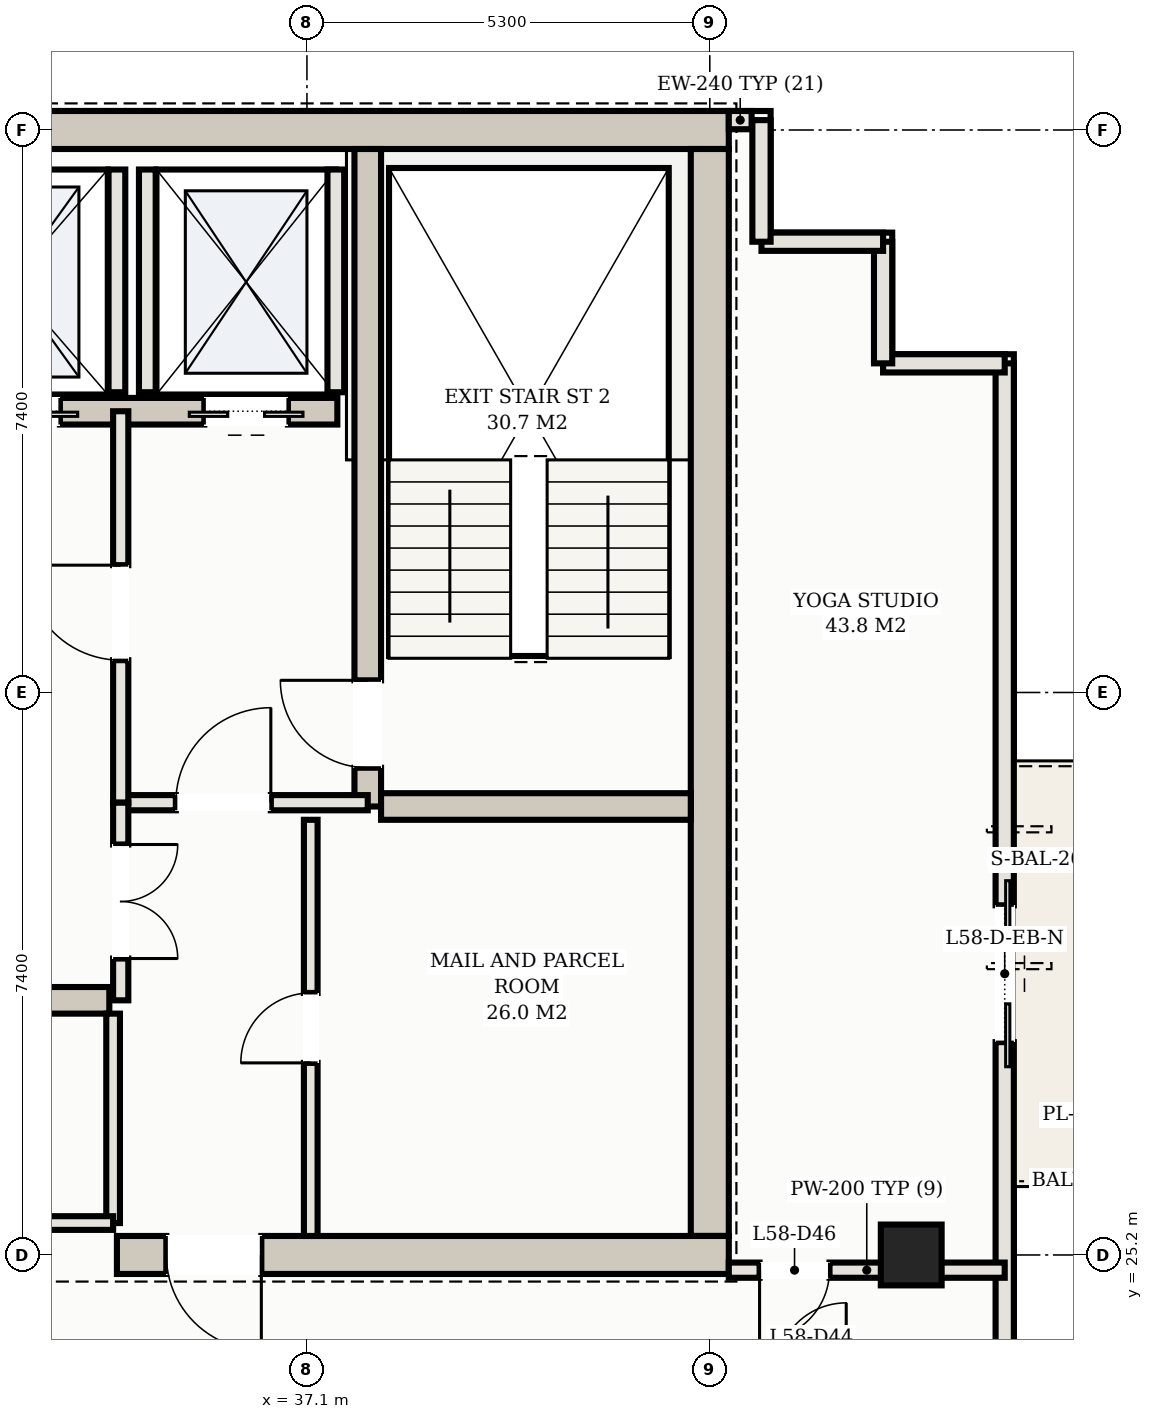
"""IFC4 building model, lengths in metres.
Left out: names, types, materials, properties, quantities, classifications, styles, units other than length and angle.
Written with IfcOpenShell. Run it as: python <this file> out.ifc"""

import sys

from ifc_helpers import new_model, si_unit, direction, frame, frame_2d, origin, origin_2d, place, context, subcontext, project, spatial, rectangle, hollow_rectangle, extrude, element, fill, save


model = new_model("IFC4")
c1 = context("Model", 3, precision=1e-05, world=origin(), true_north=direction((0.0, 1.0)))
c2 = subcontext(c1, "Body", "Model", "MODEL_VIEW")
j1 = project(units=[si_unit("LENGTHUNIT", "METRE"), si_unit("PLANEANGLEUNIT", "RADIAN")], contexts=[c1])
p1 = place(None, origin())
s1 = spatial("IfcSite", under=j1, at=p1, CompositionType="ELEMENT")
p2 = place(p1, origin())
s2 = spatial("IfcBuilding", under=s1, at=p2, CompositionType="ELEMENT")
p3 = place(p2, frame((0.0, 0.0, 213.2)))
s3 = spatial("IfcBuildingStorey", under=s2, at=p3, CompositionType="ELEMENT", Elevation=213.2)
p4 = place(p3, frame((10.35, 40.0, 0.0), z_axis=(0.0, 0.0, 1.0), x_axis=(1.0, 0.0, 0.0)))
e1 = element("IfcWall", 1, at=p4, inside=s3, PredefinedType="SHEAR", context=c2, shape_type="SweptSolid", body=[
    extrude(rectangle(XDim=32.3, YDim=0.5, at=frame_2d((16.15, 0.0))), origin(), (0.0, 0.0, 1.0), 3.11),
])
p5 = place(p3, frame((42.4, 25.45, 0.0), z_axis=(0.0, 0.0, 1.0), x_axis=(0.0, 1.0, 0.0)))
e2 = element("IfcWall", 2, at=p5, inside=s3, PredefinedType="SHEAR", context=c2, shape_type="SweptSolid", body=[
    extrude(rectangle(XDim=14.3, YDim=0.5, at=frame_2d((7.15, 0.0))), origin(), (0.0, 0.0, 1.0), 3.11),
])
p6 = place(p3, frame((34.6, 25.2, 0.0), z_axis=(0.0, 0.0, 1.0), x_axis=(1.0, 0.0, 0.0)))
e3 = element("IfcWall", 3, at=p6, inside=s3, PredefinedType="SHEAR", context=c2, shape_type="SweptSolid", body=[
    extrude(rectangle(XDim=8.05, YDim=0.5, at=frame_2d((4.025, 0.0))), origin(), (0.0, 0.0, 1.0), 3.11),
])
p7 = place(p6, frame((0.65, 0.0, 0.0)))
e4 = element("IfcOpeningElement", 4, at=p7, cuts=e3, PredefinedType="OPENING", context=c2, shape_type="SweptSolid", body=[
    extrude(rectangle(XDim=1.25, YDim=2.2, at=frame_2d((0.625, 1.1))), frame((0.0, 0.26, 0.0), z_axis=(0.0, -1.0, 0.0), x_axis=(1.0, 0.0, 0.0)), (0.0, 0.0, 1.0), 0.52),
])
p8 = place(p3, frame((37.9, 31.1, 0.0), z_axis=(0.0, 0.0, 1.0), x_axis=(0.0, 1.0, 0.0)))
e5 = element("IfcWall", 5, at=p8, inside=s3, PredefinedType="SHEAR", context=c2, shape_type="SweptSolid", body=[
    extrude(rectangle(XDim=8.65, YDim=0.35, at=frame_2d((4.325, 0.0))), origin(), (0.0, 0.0, 1.0), 3.11),
])
p9 = place(p8, frame((0.51, 0.0, 0.0)))
e6 = element("IfcOpeningElement", 6, at=p9, cuts=e5, PredefinedType="OPENING", context=c2, shape_type="SweptSolid", body=[
    extrude(rectangle(XDim=1.15, YDim=2.2, at=frame_2d((0.575, 1.1))), frame((0.0, 0.185, 0.0), z_axis=(0.0, -1.0, 0.0), x_axis=(1.0, 0.0, 0.0)), (0.0, 0.0, 1.0), 0.37),
])
p10 = place(p3, frame((38.075, 31.1, 0.0), z_axis=(0.0, 0.0, 1.0), x_axis=(1.0, 0.0, 0.0)))
e7 = element("IfcWall", 7, at=p10, inside=s3, PredefinedType="SHEAR", context=c2, shape_type="SweptSolid", body=[
    extrude(rectangle(XDim=4.075, YDim=0.35, at=frame_2d((2.038, 0.0))), origin(), (0.0, 0.0, 1.0), 3.11),
])
p11 = place(p3, frame((15.5, 36.3, 0.0), z_axis=(0.0, 0.0, 1.0), x_axis=(1.0, 0.0, 0.0)))
e8 = element("IfcWall", 8, at=p11, inside=s3, PredefinedType="SHEAR", context=c2, shape_type="SweptSolid", body=[
    extrude(rectangle(XDim=22.0, YDim=0.35, at=frame_2d((11.0, 0.0))), origin(), (0.0, 0.0, 1.0), 3.11),
])
p12 = place(p11, frame((0.65, 0.0, 0.0)))
e9 = element("IfcOpeningElement", 9, at=p12, cuts=e8, PredefinedType="OPENING", context=c2, shape_type="SweptSolid", body=[
    extrude(rectangle(XDim=1.1, YDim=2.15, at=frame_2d((0.55, 1.075))), frame((0.0, 0.185, 0.0), z_axis=(0.0, -1.0, 0.0), x_axis=(1.0, 0.0, 0.0)), (0.0, 0.0, 1.0), 0.37),
])
p13 = place(p11, frame((20.25, 0.0, 0.0)))
e10 = element("IfcOpeningElement", 10, at=p13, cuts=e8, PredefinedType="OPENING", context=c2, shape_type="SweptSolid", body=[
    extrude(rectangle(XDim=1.1, YDim=2.15, at=frame_2d((0.55, 1.075))), frame((0.0, 0.185, 0.0), z_axis=(0.0, -1.0, 0.0), x_axis=(1.0, 0.0, 0.0)), (0.0, 0.0, 1.0), 0.37),
])
p14 = place(p11, frame((17.05, 0.0, 0.0)))
e11 = element("IfcOpeningElement", 11, at=p14, cuts=e8, PredefinedType="OPENING", context=c2, shape_type="SweptSolid", body=[
    extrude(rectangle(XDim=1.3, YDim=2.2, at=frame_2d((0.65, 1.1))), frame((0.0, 0.185, 0.0), z_axis=(0.0, -1.0, 0.0), x_axis=(1.0, 0.0, 0.0)), (0.0, 0.0, 1.0), 0.37),
])
p15 = place(p11, frame((3.95, 0.0, 0.0)))
e12 = element("IfcOpeningElement", 12, at=p15, cuts=e8, PredefinedType="OPENING", context=c2, shape_type="SweptSolid", body=[
    extrude(rectangle(XDim=1.1, YDim=2.15, at=frame_2d((0.55, 1.075))), frame((0.0, 0.185, 0.0), z_axis=(0.0, -1.0, 0.0), x_axis=(1.0, 0.0, 0.0)), (0.0, 0.0, 1.0), 0.37),
])
p16 = place(p11, frame((6.55, 0.0, 0.0)))
e13 = element("IfcOpeningElement", 13, at=p16, cuts=e8, PredefinedType="OPENING", context=c2, shape_type="SweptSolid", body=[
    extrude(rectangle(XDim=1.1, YDim=2.15, at=frame_2d((0.55, 1.075))), frame((0.0, 0.185, 0.0), z_axis=(0.0, -1.0, 0.0), x_axis=(1.0, 0.0, 0.0)), (0.0, 0.0, 1.0), 0.37),
])
p17 = place(p11, frame((9.15, 0.0, 0.0)))
e14 = element("IfcOpeningElement", 14, at=p17, cuts=e8, PredefinedType="OPENING", context=c2, shape_type="SweptSolid", body=[
    extrude(rectangle(XDim=1.1, YDim=2.15, at=frame_2d((0.55, 1.075))), frame((0.0, 0.185, 0.0), z_axis=(0.0, -1.0, 0.0), x_axis=(1.0, 0.0, 0.0)), (0.0, 0.0, 1.0), 0.37),
])
p18 = place(p3, frame((18.5, 28.55, 0.0), z_axis=(0.0, 0.0, 1.0), x_axis=(1.0, 0.0, 0.0)))
e15 = element("IfcWall", 15, at=p18, inside=s3, PredefinedType="SHEAR", context=c2, shape_type="SweptSolid", body=[
    extrude(rectangle(XDim=16.0, YDim=0.35, at=frame_2d((8.0, 0.0))), origin(), (0.0, 0.0, 1.0), 3.11),
])
p19 = place(p3, frame((45.05, 25.2, 0.0), z_axis=(0.0, 0.0, 1.0), x_axis=(1.0, 0.0, 0.0)))
e16 = element("IfcColumn", 16, at=p19, inside=s3, PredefinedType="COLUMN", context=c2, shape_type="SweptSolid", body=[
    extrude(hollow_rectangle(XDim=0.8, YDim=0.8, WallThickness=0.028, at=origin_2d()), origin(), (0.0, 0.0, 1.0), 3.3),
])
for number, where, z_axis, x_axis in (
    (17, (35.0, 36.55, 0.0), (0.0, 0.0, 1.0), (0.0, 1.0, 0.0)),
    (18, (37.48, 36.55, 0.0), (0.0, 0.0, 1.0), (0.0, 1.0, 0.0)),
    (19, (34.6, 36.55, 0.0), (0.0, 0.0, 1.0), (0.0, 1.0, 0.0)),
):
    element("IfcWall", number, at=place(p3, frame(where, z_axis=z_axis, x_axis=x_axis)), inside=s3, PredefinedType="SOLIDWALL", context=c2, shape_type="SweptSolid", body=[
        extrude(rectangle(XDim=2.93, YDim=0.22, at=frame_2d((1.465, 0.0))), origin(), (0.0, 0.0, 1.0), 3.11),
    ])
p20 = place(p3, frame((46.28, 10.52, 0.0), z_axis=(0.0, 0.0, 1.0), x_axis=(0.0, 1.0, 0.0)))
e20 = element("IfcWall", 20, at=p20, inside=s3, PredefinedType="SOLIDWALL", context=c2, shape_type="SweptSolid", body=[
    extrude(rectangle(XDim=26.41, YDim=0.24, at=frame_2d((13.205, 0.0))), origin(), (0.0, 0.0, 1.0), 3.11),
])
p21 = place(p20, frame((17.48, 0.0, 0.0)))
e21 = element("IfcOpeningElement", 21, at=p21, cuts=e20, PredefinedType="OPENING", context=c2, shape_type="SweptSolid", body=[
    extrude(rectangle(XDim=1.8, YDim=2.2, at=frame_2d((0.9, 1.1))), frame((0.0, 0.13, 0.0), z_axis=(0.0, -1.0, 0.0), x_axis=(1.0, 0.0, 0.0)), (0.0, 0.0, 1.0), 0.26),
])
for number, where, z_axis, x_axis in (
    (22, (46.28, 36.93, 0.0), (0.0, 0.0, 1.0), (-1.0, 0.0, 0.0)),
    (23, (44.68, 36.93, 0.0), (0.0, 0.0, 1.0), (0.0, 1.0, 0.0)),
):
    element("IfcWall", number, at=place(p3, frame(where, z_axis=z_axis, x_axis=x_axis)), inside=s3, PredefinedType="SOLIDWALL", context=c2, shape_type="SweptSolid", body=[
        extrude(rectangle(XDim=1.6, YDim=0.24, at=frame_2d((0.8, 0.0))), origin(), (0.0, 0.0, 1.0), 3.11),
    ])
for number, where, z_axis, x_axis in (
    (24, (44.68, 38.53, 0.0), (0.0, 0.0, 1.0), (-1.0, 0.0, 0.0)),
    (25, (43.08, 38.53, 0.0), (0.0, 0.0, 1.0), (0.0, 1.0, 0.0)),
):
    element("IfcWall", number, at=place(p3, frame(where, z_axis=z_axis, x_axis=x_axis)), inside=s3, PredefinedType="SOLIDWALL", context=c2, shape_type="SweptSolid", body=[
        extrude(rectangle(XDim=1.6, YDim=0.24, at=frame_2d((0.8, 0.0))), origin(), (0.0, 0.0, 1.0), 3.11),
    ])
p22 = place(p3, frame((42.95, 40.13, 0.0), z_axis=(0.0, 0.0, 1.0), x_axis=(-1.0, 0.0, 0.0)))
e26 = element("IfcWall", 26, at=p22, inside=s3, PredefinedType="SOLIDWALL", context=c2, shape_type="SweptSolid", body=[
    extrude(rectangle(XDim=0.3, YDim=0.24, at=frame_2d((0.15, 0.0))), origin(), (0.0, 0.0, 1.0), 3.11),
])
p23 = place(p3, frame((34.65, 31.15, 0.0), z_axis=(0.0, 0.0, 1.0), x_axis=(1.0, 0.0, 0.0)))
e27 = element("IfcWall", 27, at=p23, inside=s3, PredefinedType="PARTITIONING", context=c2, shape_type="SweptSolid", body=[
    extrude(rectangle(XDim=3.25, YDim=0.2, at=frame_2d((1.625, 0.0))), origin(), (0.0, 0.0, 1.0), 2.43),
])
p24 = place(p23, frame((0.725, 0.0, 0.0)))
e28 = element("IfcOpeningElement", 28, at=p24, cuts=e27, PredefinedType="OPENING", context=c2, shape_type="SweptSolid", body=[
    extrude(rectangle(XDim=1.25, YDim=2.2, at=frame_2d((0.625, 1.1))), frame((0.0, 0.11, 0.0), z_axis=(0.0, -1.0, 0.0), x_axis=(1.0, 0.0, 0.0)), (0.0, 0.0, 1.0), 0.22),
])
p25 = place(p3, frame((34.65, 31.15, 0.0), z_axis=(0.0, 0.0, 1.0), x_axis=(0.0, 1.0, 0.0)))
e29 = element("IfcWall", 29, at=p25, inside=s3, PredefinedType="PARTITIONING", context=c2, shape_type="SweptSolid", body=[
    extrude(rectangle(XDim=5.15, YDim=0.2, at=frame_2d((2.575, 0.0))), origin(), (0.0, 0.0, 1.0), 2.43),
])
p26 = place(p25, frame((1.875, 0.0, 0.0)))
e30 = element("IfcOpeningElement", 30, at=p26, cuts=e29, PredefinedType="OPENING", context=c2, shape_type="SweptSolid", body=[
    extrude(rectangle(XDim=1.25, YDim=2.2, at=frame_2d((0.625, 1.1))), frame((0.0, 0.11, 0.0), z_axis=(0.0, -1.0, 0.0), x_axis=(1.0, 0.0, 0.0)), (0.0, 0.0, 1.0), 0.22),
])
p27 = place(p3, frame((37.15, 25.45, 0.0), z_axis=(0.0, 0.0, 1.0), x_axis=(0.0, 1.0, 0.0)))
e31 = element("IfcWall", 31, at=p27, inside=s3, PredefinedType="PARTITIONING", context=c2, shape_type="SweptSolid", body=[
    extrude(rectangle(XDim=5.475, YDim=0.18, at=frame_2d((2.738, 0.0))), origin(), (0.0, 0.0, 1.0), 2.43),
])
p28 = place(p27, frame((2.277, 0.0, 0.0)))
e32 = element("IfcOpeningElement", 32, at=p28, cuts=e31, PredefinedType="OPENING", context=c2, shape_type="SweptSolid", body=[
    extrude(rectangle(XDim=0.92, YDim=2.15, at=frame_2d((0.46, 1.075))), frame((0.0, 0.1, 0.0), z_axis=(0.0, -1.0, 0.0), x_axis=(1.0, 0.0, 0.0)), (0.0, 0.0, 1.0), 0.2),
])
p29 = place(p3, frame((34.65, 28.55, 0.0), z_axis=(0.0, 0.0, 1.0), x_axis=(0.0, 1.0, 0.0)))
e33 = element("IfcWall", 33, at=p29, inside=s3, PredefinedType="PARTITIONING", context=c2, shape_type="SweptSolid", body=[
    extrude(rectangle(XDim=2.6, YDim=0.2, at=frame_2d((1.3, 0.0))), origin(), (0.0, 0.0, 1.0), 2.43),
])
p30 = place(p29, frame((0.55, 0.0, 0.0)))
e34 = element("IfcOpeningElement", 34, at=p30, cuts=e33, PredefinedType="OPENING", context=c2, shape_type="SweptSolid", body=[
    extrude(rectangle(XDim=1.5, YDim=2.25, at=frame_2d((0.75, 1.125))), frame((0.0, 0.11, 0.0), z_axis=(0.0, -1.0, 0.0), x_axis=(1.0, 0.0, 0.0)), (0.0, 0.0, 1.0), 0.22),
])
p31 = place(p3, frame((34.55, 25.62, 0.0), z_axis=(0.0, 0.0, 1.0), x_axis=(0.0, 1.0, 0.0)))
e35 = element("IfcWall", 35, at=p31, inside=s3, PredefinedType="PARTITIONING", context=c2, shape_type="SweptSolid", body=[
    extrude(rectangle(XDim=2.755, YDim=0.18, at=frame_2d((1.377, 0.0))), origin(), (0.0, 0.0, 1.0), 2.43),
])
p32 = place(p3, frame((26.65, 25.62, 0.0), z_axis=(0.0, 0.0, 1.0), x_axis=(1.0, 0.0, 0.0)))
e36 = element("IfcWall", 36, at=p32, inside=s3, PredefinedType="PARTITIONING", context=c2, shape_type="SweptSolid", body=[
    extrude(rectangle(XDim=7.9, YDim=0.18, at=frame_2d((3.95, 0.0))), origin(), (0.0, 0.0, 1.0), 2.43),
])
p33 = place(p32, frame((3.34, 0.0, 0.0)))
e37 = element("IfcOpeningElement", 37, at=p33, cuts=e36, PredefinedType="OPENING", context=c2, shape_type="SweptSolid", body=[
    extrude(rectangle(XDim=0.92, YDim=2.15, at=frame_2d((0.46, 1.075))), frame((0.0, 0.1, 0.0), z_axis=(0.0, -1.0, 0.0), x_axis=(1.0, 0.0, 0.0)), (0.0, 0.0, 1.0), 0.2),
])
p34 = place(p3, frame((42.65, 25.0, 0.0), z_axis=(0.0, 0.0, 1.0), x_axis=(1.0, 0.0, 0.0)))
e38 = element("IfcWall", 38, at=p34, inside=s3, PredefinedType="PARTITIONING", context=c2, shape_type="SweptSolid", body=[
    extrude(rectangle(XDim=3.63, YDim=0.2, at=frame_2d((1.815, 0.0))), origin(), (0.0, 0.0, 1.0), 2.43),
])
p35 = place(p34, frame((0.405, 0.0, 0.0)))
e39 = element("IfcOpeningElement", 39, at=p35, cuts=e38, PredefinedType="OPENING", context=c2, shape_type="SweptSolid", body=[
    extrude(rectangle(XDim=0.92, YDim=2.15, at=frame_2d((0.46, 1.075))), frame((0.0, 0.11, 0.0), z_axis=(0.0, -1.0, 0.0), x_axis=(1.0, 0.0, 0.0)), (0.0, 0.0, 1.0), 0.22),
])
p36 = place(p13, frame((1.1, 0.0, 0.0), z_axis=(0.0, 0.0, 1.0), x_axis=(-1.0, 0.0, 0.0)))
e40 = element("IfcDoor", 40, at=p36, inside=s3, OperationType="DOUBLE_DOOR_SLIDING", PredefinedType="DOOR", context=c2, shape_type="SweptSolid", body=[
    extrude(rectangle(XDim=1.1, YDim=2.15, at=frame_2d((0.55, 1.075))), frame((0.0, 0.025, 0.0), z_axis=(0.0, -1.0, 0.0), x_axis=(1.0, 0.0, 0.0)), (0.0, 0.0, 1.0), 0.05),
])
fill(e10, e40)
p37 = place(p14, frame((1.3, 0.0, 0.0), z_axis=(0.0, 0.0, 1.0), x_axis=(-1.0, 0.0, 0.0)))
e41 = element("IfcDoor", 41, at=p37, inside=s3, OperationType="DOUBLE_DOOR_SLIDING", PredefinedType="DOOR", context=c2, shape_type="SweptSolid", body=[
    extrude(rectangle(XDim=1.3, YDim=2.2, at=frame_2d((0.65, 1.1))), frame((0.0, 0.025, 0.0), z_axis=(0.0, -1.0, 0.0), x_axis=(1.0, 0.0, 0.0)), (0.0, 0.0, 1.0), 0.05),
])
fill(e11, e41)
p38 = place(p21, frame((1.8, 0.0, 0.0), z_axis=(0.0, 0.0, 1.0), x_axis=(-1.0, 0.0, 0.0)))
e42 = element("IfcDoor", 42, at=p38, inside=s3, OperationType="DOUBLE_DOOR_SLIDING", PredefinedType="DOOR", context=c2, shape_type="SweptSolid", body=[
    extrude(rectangle(XDim=1.8, YDim=2.2, at=frame_2d((0.9, 1.1))), frame((0.0, 0.025, 0.0), z_axis=(0.0, -1.0, 0.0), x_axis=(1.0, 0.0, 0.0)), (0.0, 0.0, 1.0), 0.05),
])
fill(e21, e42)
p39 = place(p7, frame((1.25, 0.0, 0.0), z_axis=(0.0, 0.0, 1.0), x_axis=(-1.0, 0.0, 0.0)))
e43 = element("IfcDoor", 43, at=p39, inside=s3, OperationType="SINGLE_SWING_LEFT", PredefinedType="DOOR", context=c2, shape_type="SweptSolid", body=[
    extrude(rectangle(XDim=1.25, YDim=2.2, at=frame_2d((0.625, 1.1))), frame((0.0, 0.025, 0.0), z_axis=(0.0, -1.0, 0.0), x_axis=(1.0, 0.0, 0.0)), (0.0, 0.0, 1.0), 0.05),
])
fill(e4, e43)
p40 = place(p24, origin())
e44 = element("IfcDoor", 44, at=p40, inside=s3, OperationType="SINGLE_SWING_RIGHT", PredefinedType="DOOR", context=c2, shape_type="SweptSolid", body=[
    extrude(rectangle(XDim=1.25, YDim=2.2, at=frame_2d((0.625, 1.1))), frame((0.0, 0.025, 0.0), z_axis=(0.0, -1.0, 0.0), x_axis=(1.0, 0.0, 0.0)), (0.0, 0.0, 1.0), 0.05),
])
fill(e28, e44)
p41 = place(p26, origin())
e45 = element("IfcDoor", 45, at=p41, inside=s3, OperationType="SINGLE_SWING_RIGHT", PredefinedType="DOOR", context=c2, shape_type="SweptSolid", body=[
    extrude(rectangle(XDim=1.25, YDim=2.2, at=frame_2d((0.625, 1.1))), frame((0.0, 0.025, 0.0), z_axis=(0.0, -1.0, 0.0), x_axis=(1.0, 0.0, 0.0)), (0.0, 0.0, 1.0), 0.05),
])
fill(e30, e45)
p42 = place(p9, origin())
e46 = element("IfcDoor", 46, at=p42, inside=s3, OperationType="SINGLE_SWING_RIGHT", PredefinedType="DOOR", context=c2, shape_type="SweptSolid", body=[
    extrude(rectangle(XDim=1.15, YDim=2.2, at=frame_2d((0.575, 1.1))), frame((0.0, 0.025, 0.0), z_axis=(0.0, -1.0, 0.0), x_axis=(1.0, 0.0, 0.0)), (0.0, 0.0, 1.0), 0.05),
])
fill(e6, e46)
p43 = place(p28, origin())
e47 = element("IfcDoor", 47, at=p43, inside=s3, OperationType="SINGLE_SWING_LEFT", PredefinedType="DOOR", context=c2, shape_type="SweptSolid", body=[
    extrude(rectangle(XDim=0.92, YDim=2.15, at=frame_2d((0.46, 1.075))), frame((0.0, 0.025, 0.0), z_axis=(0.0, -1.0, 0.0), x_axis=(1.0, 0.0, 0.0)), (0.0, 0.0, 1.0), 0.05),
])
fill(e32, e47)
p44 = place(p30, frame((1.5, 0.0, 0.0), z_axis=(0.0, 0.0, 1.0), x_axis=(-1.0, 0.0, 0.0)))
e48 = element("IfcDoor", 48, at=p44, inside=s3, OperationType="DOUBLE_DOOR_SINGLE_SWING", PredefinedType="DOOR", context=c2, shape_type="SweptSolid", body=[
    extrude(rectangle(XDim=1.5, YDim=2.25, at=frame_2d((0.75, 1.125))), frame((0.0, 0.025, 0.0), z_axis=(0.0, -1.0, 0.0), x_axis=(1.0, 0.0, 0.0)), (0.0, 0.0, 1.0), 0.05),
])
fill(e34, e48)
p45 = place(p35, frame((0.92, 0.0, 0.0), z_axis=(0.0, 0.0, 1.0), x_axis=(-1.0, 0.0, 0.0)))
e49 = element("IfcDoor", 49, at=p45, inside=s3, OperationType="SINGLE_SWING_RIGHT", PredefinedType="DOOR", context=c2, shape_type="SweptSolid", body=[
    extrude(rectangle(XDim=0.92, YDim=2.15, at=frame_2d((0.46, 1.075))), frame((0.0, 0.025, 0.0), z_axis=(0.0, -1.0, 0.0), x_axis=(1.0, 0.0, 0.0)), (0.0, 0.0, 1.0), 0.05),
])
fill(e39, e49)
save(model, sys.argv[1])
